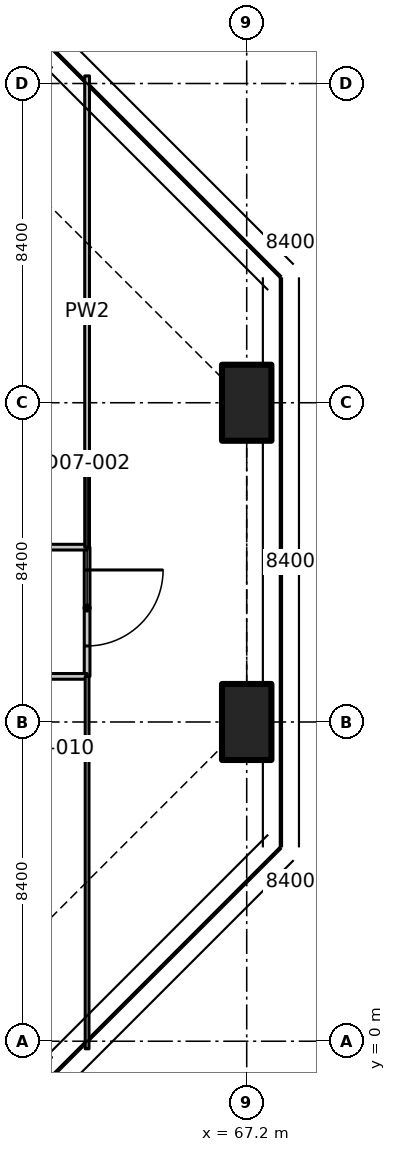
"""IFC4 building model, lengths in metres.
Left out: names, types, materials, properties, quantities, classifications, styles, units other than length and angle.
Written with IfcOpenShell. Run it as: python <this file> out.ifc"""

import sys

from ifc_helpers import new_model, si_unit, direction, frame, frame_2d, origin, origin_2d, place, context, subcontext, project, spatial, polyline, rectangle, outline, extrude, element, fill, save


model = new_model("IFC4")
c1 = context("Model", 3, precision=1e-05, world=origin(), true_north=direction((0.0, 1.0)))
c2 = subcontext(c1, "Body", "Model", "MODEL_VIEW")
j1 = project(units=[si_unit("LENGTHUNIT", "METRE"), si_unit("PLANEANGLEUNIT", "RADIAN")], contexts=[c1])
p1 = place(None, origin())
s1 = spatial("IfcSite", under=j1, at=p1, CompositionType="ELEMENT")
p2 = place(p1, origin())
s2 = spatial("IfcBuilding", under=s1, at=p2, CompositionType="ELEMENT")
p3 = place(p2, frame((0.0, 0.0, 40.1)))
s3 = spatial("IfcBuildingStorey", under=s2, at=p3, CompositionType="ELEMENT", Elevation=40.1)
for number, where, z_axis, x_axis in (
    (1, (67.2, 8.4, 0.0), (0.0, 0.0, 1.0), (1.0, 0.0, 0.0)),
    (2, (67.2, 16.8, 0.0), (0.0, 0.0, 1.0), (1.0, 0.0, 0.0)),
):
    element("IfcColumn", number, at=place(p3, frame(where, z_axis=z_axis, x_axis=x_axis)), inside=s3, PredefinedType="COLUMN", context=c2, shape_type="SweptSolid", body=[
        extrude(rectangle(XDim=1.3, YDim=2.0, at=origin_2d()), origin(), (0.0, 0.0, 1.0), 3.35),
    ])
p4 = place(p3, frame((63.0, 13.0, 0.0), z_axis=(0.0, 0.0, 1.0), x_axis=(0.0, -1.0, 0.0)))
e3 = element("IfcWall", 3, at=p4, inside=s3, PredefinedType="PARTITIONING", context=c2, shape_type="SweptSolid", body=[
    extrude(rectangle(XDim=3.4, YDim=0.15, at=frame_2d((1.7, 0.0))), origin(), (0.0, 0.0, 1.0), 3.33),
])
p5 = place(p4, frame((0.6, 0.0, 0.0)))
e4 = element("IfcOpeningElement", 4, at=p5, cuts=e3, PredefinedType="OPENING", context=c2, shape_type="SweptSolid", body=[
    extrude(rectangle(XDim=2.0, YDim=2.4, at=frame_2d((1.0, 1.2))), frame((0.0, 0.085, 0.0), z_axis=(0.0, -1.0, 0.0), x_axis=(1.0, 0.0, 0.0)), (0.0, 0.0, 1.0), 0.17),
])
p6 = place(p3, frame((63.0, 9.6, 0.0), z_axis=(0.0, 0.0, 1.0), x_axis=(-1.0, 0.0, 0.0)))
e5 = element("IfcWall", 5, at=p6, inside=s3, PredefinedType="PARTITIONING", context=c2, shape_type="SweptSolid", body=[
    extrude(rectangle(XDim=4.2, YDim=0.15, at=frame_2d((2.1, 0.0))), origin(), (0.0, 0.0, 1.0), 3.33),
])
p7 = place(p6, frame((1.5, 0.0, 0.0)))
e6 = element("IfcOpeningElement", 6, at=p7, cuts=e5, PredefinedType="OPENING", context=c2, shape_type="SweptSolid", body=[
    extrude(rectangle(XDim=1.1, YDim=2.1, at=frame_2d((0.55, 1.05))), frame((0.0, 0.085, 0.0), z_axis=(0.0, -1.0, 0.0), x_axis=(1.0, 0.0, 0.0)), (0.0, 0.0, 1.0), 0.17),
])
p8 = place(p3, frame((54.6, 13.0, 0.0), z_axis=(0.0, 0.0, 1.0), x_axis=(1.0, 0.0, 0.0)))
e7 = element("IfcWall", 7, at=p8, inside=s3, PredefinedType="PARTITIONING", context=c2, shape_type="SweptSolid", body=[
    extrude(rectangle(XDim=8.4, YDim=0.15, at=frame_2d((4.2, 0.0))), origin(), (0.0, 0.0, 1.0), 3.33),
])
p9 = place(p8, frame((3.3, 0.0, 0.0)))
e8 = element("IfcOpeningElement", 8, at=p9, cuts=e7, PredefinedType="OPENING", context=c2, shape_type="SweptSolid", body=[
    extrude(rectangle(XDim=1.6, YDim=2.1, at=frame_2d((0.8, 1.05))), frame((0.0, 0.085, 0.0), z_axis=(0.0, -1.0, 0.0), x_axis=(1.0, 0.0, 0.0)), (0.0, 0.0, 1.0), 0.17),
])
p10 = place(p3, frame((63.0, -0.2, 0.0), z_axis=(0.0, 0.0, 1.0), x_axis=(0.0, 1.0, 0.0)))
e9 = element("IfcWall", 9, at=p10, inside=s3, PredefinedType="PARTITIONING", context=c2, shape_type="SweptSolid", body=[
    extrude(outline(polyline([(0.0, 0.0), (9.8, 0.0), (9.8, 3.33), (5.066, 3.33), (5.064, 2.98), (3.736, 2.98), (3.734, 3.33), (0.0, 3.33), (0.0, 0.0)])), frame((0.0, 0.05, 0.0), z_axis=(0.0, -1.0, 0.0), x_axis=(1.0, 0.0, 0.0)), (0.0, 0.0, 1.0), 0.1),
])
p11 = place(p3, frame((63.0, 13.0, 0.0), z_axis=(0.0, 0.0, 1.0), x_axis=(0.0, 1.0, 0.0)))
e10 = element("IfcWall", 10, at=p11, inside=s3, PredefinedType="PARTITIONING", context=c2, shape_type="SweptSolid", body=[
    extrude(outline(polyline([(0.0, 0.0), (12.4, 0.0), (12.4, 3.33), (8.678, 3.33), (8.676, 2.98), (7.324, 2.98), (7.322, 3.33), (0.0, 3.33), (0.0, 0.0)])), frame((0.0, 0.062, 0.0), z_axis=(0.0, -1.0, 0.0), x_axis=(1.0, 0.0, 0.0)), (0.0, 0.0, 1.0), 0.125),
])
p12 = place(p5, origin())
e11 = element("IfcDoor", 11, at=p12, inside=s3, OperationType="DOUBLE_DOOR_SINGLE_SWING", PredefinedType="DOOR", context=c2, shape_type="SweptSolid", body=[
    extrude(rectangle(XDim=2.0, YDim=2.4, at=frame_2d((1.0, 1.2))), frame((0.0, 0.025, 0.0), z_axis=(0.0, -1.0, 0.0), x_axis=(1.0, 0.0, 0.0)), (0.0, 0.0, 1.0), 0.05),
])
fill(e4, e11)
save(model, sys.argv[1])
